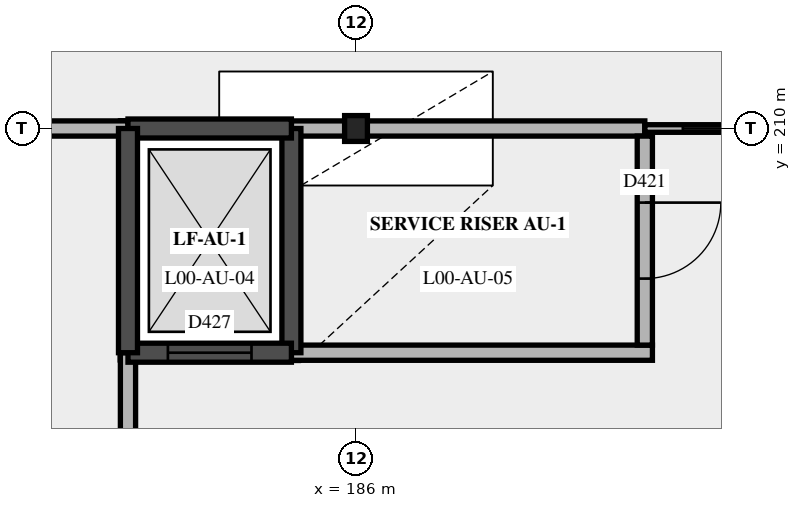
"""IFC4 building model, lengths in metres.
Left out: names, types, materials, properties, quantities, classifications, styles, units other than length and angle.
Written with IfcOpenShell. Run it as: python <this file> out.ifc"""

import sys

from ifc_helpers import new_model, si_unit, direction, frame, frame_2d, origin, origin_2d, place, context, subcontext, project, spatial, rectangle, i_section, extrude, element, fill, save


model = new_model("IFC4")
c1 = context("Model", 3, precision=1e-05, world=origin(), true_north=direction((0.0, 1.0)))
c2 = subcontext(c1, "Body", "Model", "MODEL_VIEW")
j1 = project(units=[si_unit("LENGTHUNIT", "METRE"), si_unit("PLANEANGLEUNIT", "RADIAN")], contexts=[c1])
p1 = place(None, origin())
s1 = spatial("IfcSite", under=j1, at=p1, CompositionType="ELEMENT")
p2 = place(p1, origin())
s2 = spatial("IfcBuilding", under=s1, at=p2, CompositionType="ELEMENT")
p3 = place(p2, origin())
s3 = spatial("IfcBuildingStorey", under=s2, at=p3, CompositionType="ELEMENT", Elevation=0.0)
p4 = place(p3, frame((186.0, 210.0, 0.0), z_axis=(0.0, 0.0, 1.0), x_axis=(1.0, 0.0, 0.0)))
e1 = element("IfcColumn", 1, at=p4, inside=s3, PredefinedType="COLUMN", context=c2, shape_type="SweptSolid", body=[
    extrude(i_section(OverallWidth=0.3, OverallDepth=0.34, WebThickness=0.012, FlangeThickness=0.021, at=origin_2d()), origin(), (0.0, 0.0, 1.0), 5.4),
])
p5 = place(p3, frame((185.15, 207.05, 0.0), z_axis=(0.0, 0.0, 1.0), x_axis=(1.0, 0.0, 0.0)))
e2 = element("IfcWall", 2, at=p5, inside=s3, PredefinedType="PARTITIONING", context=c2, shape_type="SweptSolid", body=[
    extrude(rectangle(XDim=4.75, YDim=0.2, at=frame_2d((2.375, 0.0))), origin(), (0.0, 0.0, 1.0), 5.15),
])
p6 = place(p3, frame((175.0, 210.0, 0.0), z_axis=(0.0, 0.0, 1.0), x_axis=(1.0, 0.0, 0.0)))
e3 = element("IfcWall", 3, at=p6, inside=s3, PredefinedType="PARTITIONING", context=c2, shape_type="SweptSolid", body=[
    extrude(rectangle(XDim=8.0, YDim=0.2, at=frame_2d((4.0, 0.0))), origin(), (0.0, 0.0, 1.0), 4.7),
])
p7 = place(p6, frame((3.5, 0.0, 0.0)))
e4 = element("IfcOpeningElement", 4, at=p7, cuts=e3, PredefinedType="OPENING", context=c2, shape_type="SweptSolid", body=[
    extrude(rectangle(XDim=1.0, YDim=2.1, at=frame_2d((0.5, 1.05))), frame((0.0, 0.11, 0.0), z_axis=(0.0, -1.0, 0.0), x_axis=(1.0, 0.0, 0.0)), (0.0, 0.0, 1.0), 0.22),
])
p8 = place(p3, frame((185.15, 210.0, 0.0), z_axis=(0.0, 0.0, 1.0), x_axis=(1.0, 0.0, 0.0)))
e5 = element("IfcWall", 5, at=p8, inside=s3, PredefinedType="PARTITIONING", context=c2, shape_type="SweptSolid", body=[
    extrude(rectangle(XDim=4.65, YDim=0.2, at=frame_2d((2.325, 0.0))), origin(), (0.0, 0.0, 1.0), 4.7),
])
p9 = place(p3, frame((189.8, 210.0, 0.0), z_axis=(0.0, 0.0, 1.0), x_axis=(1.0, 0.0, 0.0)))
e6 = element("IfcWall", 6, at=p9, inside=s3, PredefinedType="PARTITIONING", context=c2, shape_type="SweptSolid", body=[
    extrude(rectangle(XDim=3.4, YDim=0.1, at=frame_2d((1.7, 0.0))), origin(), (0.0, 0.0, 1.0), 4.7),
])
p10 = place(p9, frame((0.5, 0.0, 0.0)))
e7 = element("IfcOpeningElement", 7, at=p10, cuts=e6, PredefinedType="OPENING", context=c2, shape_type="SweptSolid", body=[
    extrude(rectangle(XDim=2.4, YDim=2.4, at=frame_2d((1.2, 1.2))), frame((0.0, 0.06, 0.0), z_axis=(0.0, -1.0, 0.0), x_axis=(1.0, 0.0, 0.0)), (0.0, 0.0, 1.0), 0.12),
])
p11 = place(p3, frame((183.0, 198.0, 0.0), z_axis=(0.0, 0.0, 1.0), x_axis=(0.0, 1.0, 0.0)))
e8 = element("IfcWall", 8, at=p11, inside=s3, PredefinedType="PARTITIONING", context=c2, shape_type="SweptSolid", body=[
    extrude(rectangle(XDim=9.05, YDim=0.2, at=frame_2d((4.525, 0.0))), origin(), (0.0, 0.0, 1.0), 4.8),
])
p12 = place(p11, frame((5.5, 0.0, 0.0)))
e9 = element("IfcOpeningElement", 9, at=p12, cuts=e8, PredefinedType="OPENING", context=c2, shape_type="SweptSolid", body=[
    extrude(rectangle(XDim=1.0, YDim=2.1, at=frame_2d((0.5, 1.05))), frame((0.0, 0.11, 0.0), z_axis=(0.0, -1.0, 0.0), x_axis=(1.0, 0.0, 0.0)), (0.0, 0.0, 1.0), 0.22),
])
p13 = place(p3, frame((189.8, 207.15, 0.0), z_axis=(0.0, 0.0, 1.0), x_axis=(0.0, 1.0, 0.0)))
e10 = element("IfcWall", 10, at=p13, inside=s3, PredefinedType="PARTITIONING", context=c2, shape_type="SweptSolid", body=[
    extrude(rectangle(XDim=2.75, YDim=0.2, at=frame_2d((1.375, 0.0))), origin(), (0.0, 0.0, 1.0), 5.15),
])
p14 = place(p13, frame((0.875, 0.0, 0.0)))
e11 = element("IfcOpeningElement", 11, at=p14, cuts=e10, PredefinedType="OPENING", context=c2, shape_type="SweptSolid", body=[
    extrude(rectangle(XDim=1.0, YDim=2.1, at=frame_2d((0.5, 1.05))), frame((0.0, 0.11, 0.0), z_axis=(0.0, -1.0, 0.0), x_axis=(1.0, 0.0, 0.0)), (0.0, 0.0, 1.0), 0.22),
])
p15 = place(p3, frame((185.15, 207.05, -1.4), z_axis=(0.0, 0.0, 1.0), x_axis=(0.0, 1.0, 0.0)))
e12 = element("IfcWall", 12, at=p15, inside=s3, PredefinedType="SHEAR", context=c2, shape_type="SweptSolid", body=[
    extrude(rectangle(XDim=2.95, YDim=0.25, at=frame_2d((1.475, 0.0))), origin(), (0.0, 0.0, 1.0), 6.8),
])
p16 = place(p3, frame((185.15, 210.0, -1.4), z_axis=(0.0, 0.0, 1.0), x_axis=(-1.0, 0.0, 0.0)))
e13 = element("IfcWall", 13, at=p16, inside=s3, PredefinedType="SHEAR", context=c2, shape_type="SweptSolid", body=[
    extrude(rectangle(XDim=2.15, YDim=0.25, at=frame_2d((1.075, 0.0))), origin(), (0.0, 0.0, 1.0), 6.8),
])
p17 = place(p3, frame((183.0, 207.05, -1.4), z_axis=(0.0, 0.0, 1.0), x_axis=(1.0, 0.0, 0.0)))
e14 = element("IfcWall", 14, at=p17, inside=s3, PredefinedType="SHEAR", context=c2, shape_type="SweptSolid", body=[
    extrude(rectangle(XDim=2.15, YDim=0.25, at=frame_2d((1.075, 0.0))), origin(), (0.0, 0.0, 1.0), 6.8),
])
p18 = place(p17, frame((0.525, 0.0, 1.4)))
e15 = element("IfcOpeningElement", 15, at=p18, cuts=e14, PredefinedType="OPENING", context=c2, shape_type="SweptSolid", body=[
    extrude(rectangle(XDim=1.1, YDim=2.1, at=frame_2d((0.55, 1.05))), frame((0.0, 0.135, 0.0), z_axis=(0.0, -1.0, 0.0), x_axis=(1.0, 0.0, 0.0)), (0.0, 0.0, 1.0), 0.27),
])
p19 = place(p3, frame((183.0, 210.0, -1.4), z_axis=(0.0, 0.0, 1.0), x_axis=(0.0, -1.0, 0.0)))
e16 = element("IfcWall", 16, at=p19, inside=s3, PredefinedType="SHEAR", context=c2, shape_type="SweptSolid", body=[
    extrude(rectangle(XDim=2.95, YDim=0.25, at=frame_2d((1.475, 0.0))), origin(), (0.0, 0.0, 1.0), 6.8),
])
p20 = place(p10, origin())
e17 = element("IfcDoor", 17, at=p20, inside=s3, OperationType="SLIDING_TO_LEFT", PredefinedType="DOOR", context=c2, shape_type="SweptSolid", body=[
    extrude(rectangle(XDim=2.4, YDim=2.4, at=frame_2d((1.2, 1.2))), frame((0.0, 0.025, 0.0), z_axis=(0.0, -1.0, 0.0), x_axis=(1.0, 0.0, 0.0)), (0.0, 0.0, 1.0), 0.05),
])
fill(e7, e17)
p21 = place(p14, origin())
e18 = element("IfcDoor", 18, at=p21, inside=s3, OperationType="SINGLE_SWING_LEFT", PredefinedType="DOOR", context=c2, shape_type="SweptSolid", body=[
    extrude(rectangle(XDim=1.0, YDim=2.1, at=frame_2d((0.5, 1.05))), frame((0.0, 0.025, 0.0), z_axis=(0.0, -1.0, 0.0), x_axis=(1.0, 0.0, 0.0)), (0.0, 0.0, 1.0), 0.05),
])
fill(e11, e18)
p22 = place(p18, origin())
e19 = element("IfcDoor", 19, at=p22, inside=s3, OperationType="SLIDING_TO_LEFT", PredefinedType="DOOR", context=c2, shape_type="SweptSolid", body=[
    extrude(rectangle(XDim=1.1, YDim=2.1, at=frame_2d((0.55, 1.05))), frame((0.0, 0.025, 0.0), z_axis=(0.0, -1.0, 0.0), x_axis=(1.0, 0.0, 0.0)), (0.0, 0.0, 1.0), 0.05),
])
fill(e15, e19)
save(model, sys.argv[1])
